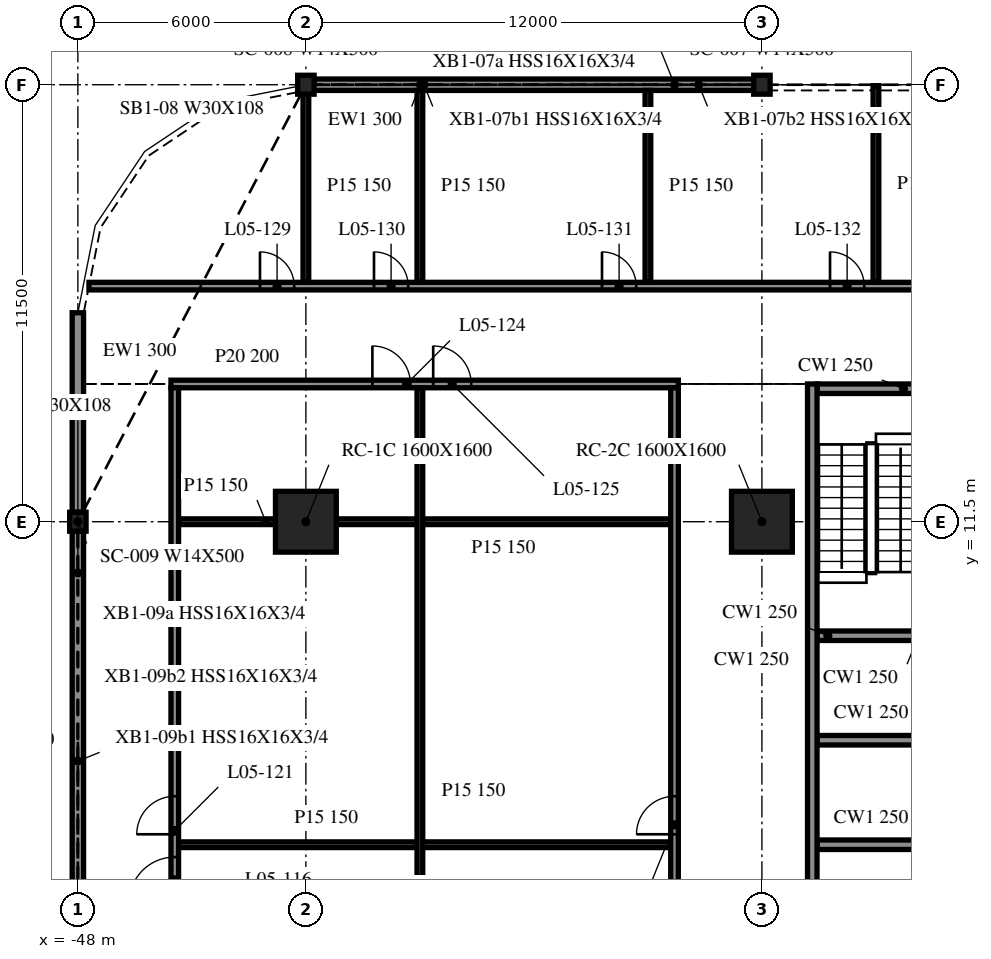
"""IFC4 building model, lengths in metres.
Left out: names, types, materials, properties, quantities, classifications, styles, units other than length and angle.
Written with IfcOpenShell. Run it as: python <this file> out.ifc"""

import sys

from ifc_helpers import new_model, si_unit, direction, frame, frame_2d, origin, origin_2d, place, context, subcontext, project, spatial, rectangle, i_section, extrude, element, fill, save


model = new_model("IFC4")
c1 = context("Model", 3, precision=1e-05, world=origin(), true_north=direction((0.0, 1.0)))
c2 = subcontext(c1, "Body", "Model", "MODEL_VIEW")
j1 = project(units=[si_unit("LENGTHUNIT", "METRE"), si_unit("PLANEANGLEUNIT", "RADIAN")], contexts=[c1])
p1 = place(None, origin())
s1 = spatial("IfcSite", under=j1, at=p1, CompositionType="ELEMENT")
p2 = place(p1, origin())
s2 = spatial("IfcBuilding", under=s1, at=p2, CompositionType="ELEMENT")
p3 = place(p2, frame((0.0, 0.0, 24.4)))
s3 = spatial("IfcBuildingStorey", under=s2, at=p3, CompositionType="ELEMENT", Elevation=24.4)
for number, where, z_axis, x_axis in (
    (1, (-42.0, 11.5, -0.34), (0.0, 0.0, 1.0), (1.0, 0.0, 0.0)),
    (2, (-30.0, 11.5, -0.34), (0.0, 0.0, 1.0), (1.0, 0.0, 0.0)),
):
    element("IfcColumn", number, at=place(p3, frame(where, z_axis=z_axis, x_axis=x_axis)), inside=s3, PredefinedType="COLUMN", context=c2, shape_type="SweptSolid", body=[
        extrude(rectangle(XDim=1.6, YDim=1.6, at=origin_2d()), origin(), (0.0, 0.0, 1.0), 4.3),
    ])
for number, where, z_axis, x_axis in (
    (3, (-30.0, 23.0, -0.34), (0.0, 0.0, 1.0), (1.0, 0.0, 0.0)),
    (4, (-42.0, 23.0, -0.34), (0.0, 0.0, 1.0), (1.0, 0.0, 0.0)),
    (5, (-48.0, 11.5, -0.34), (0.0, 0.0, 1.0), (1.0, 0.0, 0.0)),
):
    element("IfcColumn", number, at=place(p3, frame(where, z_axis=z_axis, x_axis=x_axis)), inside=s3, PredefinedType="COLUMN", context=c2, shape_type="SweptSolid", body=[
        extrude(i_section(OverallWidth=0.432, OverallDepth=0.498, WebThickness=0.056, FlangeThickness=0.089, at=origin_2d()), origin(), (0.0, 0.0, 1.0), 4.3),
    ])
p4 = place(p3, frame((-30.028, 23.0, 0.0), z_axis=(0.0, 0.0, 1.0), x_axis=(-1.0, 0.0, 0.0)))
e6 = element("IfcWall", 6, at=p4, inside=s3, PredefinedType="NOTDEFINED", context=c2, shape_type="SweptSolid", body=[
    extrude(rectangle(XDim=11.944, YDim=0.3, at=frame_2d((5.972, 0.0))), origin(), (0.0, 0.0, 1.0), 3.203),
])
p5 = place(p3, frame((-48.0, 17.0, 0.0), z_axis=(0.0, 0.0, 1.0), x_axis=(0.0, -1.0, 0.0)))
e7 = element("IfcWall", 7, at=p5, inside=s3, PredefinedType="NOTDEFINED", context=c2, shape_type="SweptSolid", body=[
    extrude(rectangle(XDim=5.251, YDim=0.3, at=frame_2d((2.625, 0.0))), origin(), (0.0, 0.0, 1.0), 3.203),
])
p6 = place(p3, frame((-48.0, 11.251, 0.0), z_axis=(0.0, 0.0, 1.0), x_axis=(0.0, -1.0, 0.0)))
e8 = element("IfcWall", 8, at=p6, inside=s3, PredefinedType="NOTDEFINED", context=c2, shape_type="SweptSolid", body=[
    extrude(rectangle(XDim=11.002, YDim=0.3, at=frame_2d((5.501, 0.0))), origin(), (0.0, 0.0, 1.0), 3.203),
])
p7 = place(p3, frame((-28.675, 15.125, 0.0), z_axis=(0.0, 0.0, 1.0), x_axis=(0.0, -1.0, 0.0)))
e9 = element("IfcWall", 9, at=p7, inside=s3, PredefinedType="SOLIDWALL", context=c2, shape_type="SweptSolid", body=[
    extrude(rectangle(XDim=24.25, YDim=0.25, at=frame_2d((12.125, 0.0))), origin(), (0.0, 0.0, 1.0), 3.96),
])
p8 = place(p3, frame((-28.55, 15.0, 0.0), z_axis=(0.0, 0.0, 1.0), x_axis=(1.0, 0.0, 0.0)))
e10 = element("IfcWall", 10, at=p8, inside=s3, PredefinedType="SOLIDWALL", context=c2, shape_type="SweptSolid", body=[
    extrude(rectangle(XDim=9.1, YDim=0.25, at=frame_2d((4.55, 0.0))), origin(), (0.0, 0.0, 1.0), 3.96),
])
p9 = place(p8, frame((3.65, 0.0, 0.0)))
e11 = element("IfcOpeningElement", 11, at=p9, cuts=e10, PredefinedType="OPENING", context=c2, shape_type="SweptSolid", body=[
    extrude(rectangle(XDim=1.8, YDim=2.1, at=frame_2d((0.9, 1.05))), frame((0.0, 0.135, 0.0), z_axis=(0.0, -1.0, 0.0), x_axis=(1.0, 0.0, 0.0)), (0.0, 0.0, 1.0), 0.27),
])
for number, where, z_axis, x_axis in (
    (12, (-28.55, 3.0, 0.0), (0.0, 0.0, 1.0), (1.0, 0.0, 0.0)),
    (13, (-28.55, 5.75, 0.0), (0.0, 0.0, 1.0), (1.0, 0.0, 0.0)),
    (14, (-28.55, 8.5, 0.0), (0.0, 0.0, 1.0), (1.0, 0.0, 0.0)),
):
    element("IfcWall", number, at=place(p3, frame(where, z_axis=z_axis, x_axis=x_axis)), inside=s3, PredefinedType="SOLIDWALL", context=c2, shape_type="SweptSolid", body=[
        extrude(rectangle(XDim=2.85, YDim=0.25, at=frame_2d((1.425, 0.0))), origin(), (0.0, 0.0, 1.0), 3.96),
    ])
p10 = place(p3, frame((-45.35, 3.0, 0.0), z_axis=(0.0, 0.0, 1.0), x_axis=(1.0, 0.0, 0.0)))
e15 = element("IfcWall", 15, at=p10, inside=s3, PredefinedType="PARTITIONING", context=c2, shape_type="SweptSolid", body=[
    extrude(rectangle(XDim=12.95, YDim=0.15, at=frame_2d((6.475, 0.0))), origin(), (0.0, 0.0, 1.0), 3.96),
])
p11 = place(p3, frame((-45.35, 11.5, 0.0), z_axis=(0.0, 0.0, 1.0), x_axis=(1.0, 0.0, 0.0)))
e16 = element("IfcWall", 16, at=p11, inside=s3, PredefinedType="PARTITIONING", context=c2, shape_type="SweptSolid", body=[
    extrude(rectangle(XDim=2.55, YDim=0.15, at=frame_2d((1.275, 0.0))), origin(), (0.0, 0.0, 1.0), 3.96),
])
p12 = place(p3, frame((-41.2, 11.5, 0.0), z_axis=(0.0, 0.0, 1.0), x_axis=(1.0, 0.0, 0.0)))
e17 = element("IfcWall", 17, at=p12, inside=s3, PredefinedType="PARTITIONING", context=c2, shape_type="SweptSolid", body=[
    extrude(rectangle(XDim=8.8, YDim=0.15, at=frame_2d((4.4, 0.0))), origin(), (0.0, 0.0, 1.0), 3.96),
])
p13 = place(p3, frame((-45.55, 15.125, 0.0), z_axis=(0.0, 0.0, 1.0), x_axis=(1.0, 0.0, 0.0)))
e18 = element("IfcWall", 18, at=p13, inside=s3, PredefinedType="PARTITIONING", context=c2, shape_type="SweptSolid", body=[
    extrude(rectangle(XDim=13.35, YDim=0.2, at=frame_2d((6.675, 0.0))), origin(), (0.0, 0.0, 1.0), 3.96),
])
p14 = place(p13, frame((5.3, 0.0, 0.0)))
e19 = element("IfcOpeningElement", 19, at=p14, cuts=e18, PredefinedType="OPENING", context=c2, shape_type="SweptSolid", body=[
    extrude(rectangle(XDim=1.0, YDim=2.1, at=frame_2d((0.5, 1.05))), frame((0.0, 0.11, 0.0), z_axis=(0.0, -1.0, 0.0), x_axis=(1.0, 0.0, 0.0)), (0.0, 0.0, 1.0), 0.22),
])
p15 = place(p13, frame((6.9, 0.0, 0.0)))
e20 = element("IfcOpeningElement", 20, at=p15, cuts=e18, PredefinedType="OPENING", context=c2, shape_type="SweptSolid", body=[
    extrude(rectangle(XDim=1.0, YDim=2.1, at=frame_2d((0.5, 1.05))), frame((0.0, 0.11, 0.0), z_axis=(0.0, -1.0, 0.0), x_axis=(1.0, 0.0, 0.0)), (0.0, 0.0, 1.0), 0.22),
])
p16 = place(p3, frame((-47.708, 17.7, 0.0), z_axis=(0.0, 0.0, 1.0), x_axis=(1.0, 0.0, 0.0)))
e21 = element("IfcWall", 21, at=p16, inside=s3, PredefinedType="PARTITIONING", context=c2, shape_type="SweptSolid", body=[
    extrude(rectangle(XDim=95.416, YDim=0.2, at=frame_2d((47.708, 0.0))), origin(), (0.0, 0.0, 1.0), 3.96),
])
p17 = place(p16, frame((4.5, 0.0, 0.0)))
e22 = element("IfcOpeningElement", 22, at=p17, cuts=e21, PredefinedType="OPENING", context=c2, shape_type="SweptSolid", body=[
    extrude(rectangle(XDim=0.9, YDim=2.1, at=frame_2d((0.45, 1.05))), frame((0.0, 0.11, 0.0), z_axis=(0.0, -1.0, 0.0), x_axis=(1.0, 0.0, 0.0)), (0.0, 0.0, 1.0), 0.22),
])
p18 = place(p16, frame((7.5, 0.0, 0.0)))
e23 = element("IfcOpeningElement", 23, at=p18, cuts=e21, PredefinedType="OPENING", context=c2, shape_type="SweptSolid", body=[
    extrude(rectangle(XDim=0.9, YDim=2.1, at=frame_2d((0.45, 1.05))), frame((0.0, 0.11, 0.0), z_axis=(0.0, -1.0, 0.0), x_axis=(1.0, 0.0, 0.0)), (0.0, 0.0, 1.0), 0.22),
])
p19 = place(p16, frame((13.5, 0.0, 0.0)))
e24 = element("IfcOpeningElement", 24, at=p19, cuts=e21, PredefinedType="OPENING", context=c2, shape_type="SweptSolid", body=[
    extrude(rectangle(XDim=0.9, YDim=2.1, at=frame_2d((0.45, 1.05))), frame((0.0, 0.11, 0.0), z_axis=(0.0, -1.0, 0.0), x_axis=(1.0, 0.0, 0.0)), (0.0, 0.0, 1.0), 0.22),
])
p20 = place(p16, frame((19.5, 0.0, 0.0)))
e25 = element("IfcOpeningElement", 25, at=p20, cuts=e21, PredefinedType="OPENING", context=c2, shape_type="SweptSolid", body=[
    extrude(rectangle(XDim=0.9, YDim=2.1, at=frame_2d((0.45, 1.05))), frame((0.0, 0.11, 0.0), z_axis=(0.0, -1.0, 0.0), x_axis=(1.0, 0.0, 0.0)), (0.0, 0.0, 1.0), 0.22),
])
p21 = place(p16, frame((28.5, 0.0, 0.0)))
e26 = element("IfcOpeningElement", 26, at=p21, cuts=e21, PredefinedType="OPENING", context=c2, shape_type="SweptSolid", body=[
    extrude(rectangle(XDim=0.9, YDim=2.1, at=frame_2d((0.45, 1.05))), frame((0.0, 0.11, 0.0), z_axis=(0.0, -1.0, 0.0), x_axis=(1.0, 0.0, 0.0)), (0.0, 0.0, 1.0), 0.22),
])
p22 = place(p16, frame((31.5, 0.0, 0.0)))
e27 = element("IfcOpeningElement", 27, at=p22, cuts=e21, PredefinedType="OPENING", context=c2, shape_type="SweptSolid", body=[
    extrude(rectangle(XDim=0.9, YDim=2.1, at=frame_2d((0.45, 1.05))), frame((0.0, 0.11, 0.0), z_axis=(0.0, -1.0, 0.0), x_axis=(1.0, 0.0, 0.0)), (0.0, 0.0, 1.0), 0.22),
])
p23 = place(p16, frame((34.5, 0.0, 0.0)))
e28 = element("IfcOpeningElement", 28, at=p23, cuts=e21, PredefinedType="OPENING", context=c2, shape_type="SweptSolid", body=[
    extrude(rectangle(XDim=0.9, YDim=2.1, at=frame_2d((0.45, 1.05))), frame((0.0, 0.11, 0.0), z_axis=(0.0, -1.0, 0.0), x_axis=(1.0, 0.0, 0.0)), (0.0, 0.0, 1.0), 0.22),
])
p24 = place(p16, frame((37.5, 0.0, 0.0)))
e29 = element("IfcOpeningElement", 29, at=p24, cuts=e21, PredefinedType="OPENING", context=c2, shape_type="SweptSolid", body=[
    extrude(rectangle(XDim=0.9, YDim=2.1, at=frame_2d((0.45, 1.05))), frame((0.0, 0.11, 0.0), z_axis=(0.0, -1.0, 0.0), x_axis=(1.0, 0.0, 0.0)), (0.0, 0.0, 1.0), 0.22),
])
p25 = place(p16, frame((43.5, 0.0, 0.0)))
e30 = element("IfcOpeningElement", 30, at=p25, cuts=e21, PredefinedType="OPENING", context=c2, shape_type="SweptSolid", body=[
    extrude(rectangle(XDim=0.9, YDim=2.1, at=frame_2d((0.45, 1.05))), frame((0.0, 0.11, 0.0), z_axis=(0.0, -1.0, 0.0), x_axis=(1.0, 0.0, 0.0)), (0.0, 0.0, 1.0), 0.22),
])
p26 = place(p16, frame((47.3, 0.0, 0.0)))
e31 = element("IfcOpeningElement", 31, at=p26, cuts=e21, PredefinedType="OPENING", context=c2, shape_type="SweptSolid", body=[
    extrude(rectangle(XDim=0.9, YDim=2.1, at=frame_2d((0.45, 1.05))), frame((0.0, 0.11, 0.0), z_axis=(0.0, -1.0, 0.0), x_axis=(1.0, 0.0, 0.0)), (0.0, 0.0, 1.0), 0.22),
])
p27 = place(p16, frame((51.1, 0.0, 0.0)))
e32 = element("IfcOpeningElement", 32, at=p27, cuts=e21, PredefinedType="OPENING", context=c2, shape_type="SweptSolid", body=[
    extrude(rectangle(XDim=0.9, YDim=2.1, at=frame_2d((0.45, 1.05))), frame((0.0, 0.11, 0.0), z_axis=(0.0, -1.0, 0.0), x_axis=(1.0, 0.0, 0.0)), (0.0, 0.0, 1.0), 0.22),
])
p28 = place(p16, frame((60.1, 0.0, 0.0)))
e33 = element("IfcOpeningElement", 33, at=p28, cuts=e21, PredefinedType="OPENING", context=c2, shape_type="SweptSolid", body=[
    extrude(rectangle(XDim=0.9, YDim=2.1, at=frame_2d((0.45, 1.05))), frame((0.0, 0.11, 0.0), z_axis=(0.0, -1.0, 0.0), x_axis=(1.0, 0.0, 0.0)), (0.0, 0.0, 1.0), 0.22),
])
p29 = place(p16, frame((63.1, 0.0, 0.0)))
e34 = element("IfcOpeningElement", 34, at=p29, cuts=e21, PredefinedType="OPENING", context=c2, shape_type="SweptSolid", body=[
    extrude(rectangle(XDim=0.9, YDim=2.1, at=frame_2d((0.45, 1.05))), frame((0.0, 0.11, 0.0), z_axis=(0.0, -1.0, 0.0), x_axis=(1.0, 0.0, 0.0)), (0.0, 0.0, 1.0), 0.22),
])
p30 = place(p16, frame((66.1, 0.0, 0.0)))
e35 = element("IfcOpeningElement", 35, at=p30, cuts=e21, PredefinedType="OPENING", context=c2, shape_type="SweptSolid", body=[
    extrude(rectangle(XDim=0.9, YDim=2.1, at=frame_2d((0.45, 1.05))), frame((0.0, 0.11, 0.0), z_axis=(0.0, -1.0, 0.0), x_axis=(1.0, 0.0, 0.0)), (0.0, 0.0, 1.0), 0.22),
])
p31 = place(p16, frame((69.1, 0.0, 0.0)))
e36 = element("IfcOpeningElement", 36, at=p31, cuts=e21, PredefinedType="OPENING", context=c2, shape_type="SweptSolid", body=[
    extrude(rectangle(XDim=0.9, YDim=2.1, at=frame_2d((0.45, 1.05))), frame((0.0, 0.11, 0.0), z_axis=(0.0, -1.0, 0.0), x_axis=(1.0, 0.0, 0.0)), (0.0, 0.0, 1.0), 0.22),
])
p32 = place(p16, frame((75.1, 0.0, 0.0)))
e37 = element("IfcOpeningElement", 37, at=p32, cuts=e21, PredefinedType="OPENING", context=c2, shape_type="SweptSolid", body=[
    extrude(rectangle(XDim=0.9, YDim=2.1, at=frame_2d((0.45, 1.05))), frame((0.0, 0.11, 0.0), z_axis=(0.0, -1.0, 0.0), x_axis=(1.0, 0.0, 0.0)), (0.0, 0.0, 1.0), 0.22),
])
p33 = place(p16, frame((81.1, 0.0, 0.0)))
e38 = element("IfcOpeningElement", 38, at=p33, cuts=e21, PredefinedType="OPENING", context=c2, shape_type="SweptSolid", body=[
    extrude(rectangle(XDim=0.9, YDim=2.1, at=frame_2d((0.45, 1.05))), frame((0.0, 0.11, 0.0), z_axis=(0.0, -1.0, 0.0), x_axis=(1.0, 0.0, 0.0)), (0.0, 0.0, 1.0), 0.22),
])
p34 = place(p16, frame((90.1, 0.0, 0.0)))
e39 = element("IfcOpeningElement", 39, at=p34, cuts=e21, PredefinedType="OPENING", context=c2, shape_type="SweptSolid", body=[
    extrude(rectangle(XDim=0.9, YDim=2.1, at=frame_2d((0.45, 1.05))), frame((0.0, 0.11, 0.0), z_axis=(0.0, -1.0, 0.0), x_axis=(1.0, 0.0, 0.0)), (0.0, 0.0, 1.0), 0.22),
])
p35 = place(p3, frame((-45.45, -9.025, 0.0), z_axis=(0.0, 0.0, 1.0), x_axis=(0.0, 1.0, 0.0)))
e40 = element("IfcWall", 40, at=p35, inside=s3, PredefinedType="PARTITIONING", context=c2, shape_type="SweptSolid", body=[
    extrude(rectangle(XDim=24.05, YDim=0.2, at=frame_2d((12.025, 0.0))), origin(), (0.0, 0.0, 1.0), 3.96),
])
p36 = place(p35, frame((10.5, 0.0, 0.0)))
e41 = element("IfcOpeningElement", 41, at=p36, cuts=e40, PredefinedType="OPENING", context=c2, shape_type="SweptSolid", body=[
    extrude(rectangle(XDim=1.2, YDim=2.1, at=frame_2d((0.6, 1.05))), frame((0.0, 0.11, 0.0), z_axis=(0.0, -1.0, 0.0), x_axis=(1.0, 0.0, 0.0)), (0.0, 0.0, 1.0), 0.22),
])
p37 = place(p35, frame((12.3, 0.0, 0.0)))
e42 = element("IfcOpeningElement", 42, at=p37, cuts=e40, PredefinedType="OPENING", context=c2, shape_type="SweptSolid", body=[
    extrude(rectangle(XDim=1.0, YDim=2.1, at=frame_2d((0.5, 1.05))), frame((0.0, 0.11, 0.0), z_axis=(0.0, -1.0, 0.0), x_axis=(1.0, 0.0, 0.0)), (0.0, 0.0, 1.0), 0.22),
])
p38 = place(p3, frame((-42.0, 17.8, 0.0), z_axis=(0.0, 0.0, 1.0), x_axis=(0.0, 1.0, 0.0)))
e43 = element("IfcWall", 43, at=p38, inside=s3, PredefinedType="PARTITIONING", context=c2, shape_type="SweptSolid", body=[
    extrude(rectangle(XDim=5.047, YDim=0.15, at=frame_2d((2.523, 0.0))), origin(), (0.0, 0.0, 1.0), 3.96),
])
p39 = place(p3, frame((-39.0, -9.025, 0.0), z_axis=(0.0, 0.0, 1.0), x_axis=(0.0, 1.0, 0.0)))
e44 = element("IfcWall", 44, at=p39, inside=s3, PredefinedType="PARTITIONING", context=c2, shape_type="SweptSolid", body=[
    extrude(rectangle(XDim=24.05, YDim=0.15, at=frame_2d((12.025, 0.0))), origin(), (0.0, 0.0, 1.0), 3.96),
])
for number, where, z_axis, x_axis in (
    (45, (-39.0, 17.8, 0.0), (0.0, 0.0, 1.0), (0.0, 1.0, 0.0)),
    (46, (-33.0, 17.8, 0.0), (0.0, 0.0, 1.0), (0.0, 1.0, 0.0)),
):
    element("IfcWall", number, at=place(p3, frame(where, z_axis=z_axis, x_axis=x_axis)), inside=s3, PredefinedType="PARTITIONING", context=c2, shape_type="SweptSolid", body=[
        extrude(rectangle(XDim=5.05, YDim=0.15, at=frame_2d((2.525, 0.0))), origin(), (0.0, 0.0, 1.0), 3.96),
    ])
p40 = place(p3, frame((-32.3, -9.025, 0.0), z_axis=(0.0, 0.0, 1.0), x_axis=(0.0, 1.0, 0.0)))
e47 = element("IfcWall", 47, at=p40, inside=s3, PredefinedType="PARTITIONING", context=c2, shape_type="SweptSolid", body=[
    extrude(rectangle(XDim=24.05, YDim=0.2, at=frame_2d((12.025, 0.0))), origin(), (0.0, 0.0, 1.0), 3.96),
])
p41 = place(p40, frame((12.3, 0.0, 0.0)))
e48 = element("IfcOpeningElement", 48, at=p41, cuts=e47, PredefinedType="OPENING", context=c2, shape_type="SweptSolid", body=[
    extrude(rectangle(XDim=1.0, YDim=2.1, at=frame_2d((0.5, 1.05))), frame((0.0, 0.11, 0.0), z_axis=(0.0, -1.0, 0.0), x_axis=(1.0, 0.0, 0.0)), (0.0, 0.0, 1.0), 0.22),
])
p42 = place(p3, frame((-27.0, 17.8, 0.0), z_axis=(0.0, 0.0, 1.0), x_axis=(0.0, 1.0, 0.0)))
e49 = element("IfcWall", 49, at=p42, inside=s3, PredefinedType="PARTITIONING", context=c2, shape_type="SweptSolid", body=[
    extrude(rectangle(XDim=5.175, YDim=0.15, at=frame_2d((2.587, 0.0))), origin(), (0.0, 0.0, 1.0), 3.96),
])
p43 = place(p36, origin())
e50 = element("IfcDoor", 50, at=p43, inside=s3, OperationType="SINGLE_SWING_RIGHT", PredefinedType="DOOR", context=c2, shape_type="SweptSolid", body=[
    extrude(rectangle(XDim=1.2, YDim=2.1, at=frame_2d((0.6, 1.05))), frame((0.0, 0.025, 0.0), z_axis=(0.0, -1.0, 0.0), x_axis=(1.0, 0.0, 0.0)), (0.0, 0.0, 1.0), 0.05),
])
fill(e41, e50)
p44 = place(p37, origin())
e51 = element("IfcDoor", 51, at=p44, inside=s3, OperationType="SINGLE_SWING_LEFT", PredefinedType="DOOR", context=c2, shape_type="SweptSolid", body=[
    extrude(rectangle(XDim=1.0, YDim=2.1, at=frame_2d((0.5, 1.05))), frame((0.0, 0.025, 0.0), z_axis=(0.0, -1.0, 0.0), x_axis=(1.0, 0.0, 0.0)), (0.0, 0.0, 1.0), 0.05),
])
fill(e42, e51)
p45 = place(p41, origin())
e52 = element("IfcDoor", 52, at=p45, inside=s3, OperationType="SINGLE_SWING_RIGHT", PredefinedType="DOOR", context=c2, shape_type="SweptSolid", body=[
    extrude(rectangle(XDim=1.0, YDim=2.1, at=frame_2d((0.5, 1.05))), frame((0.0, 0.025, 0.0), z_axis=(0.0, -1.0, 0.0), x_axis=(1.0, 0.0, 0.0)), (0.0, 0.0, 1.0), 0.05),
])
fill(e48, e52)
p46 = place(p14, origin())
e53 = element("IfcDoor", 53, at=p46, inside=s3, OperationType="SINGLE_SWING_RIGHT", PredefinedType="DOOR", context=c2, shape_type="SweptSolid", body=[
    extrude(rectangle(XDim=1.0, YDim=2.1, at=frame_2d((0.5, 1.05))), frame((0.0, 0.025, 0.0), z_axis=(0.0, -1.0, 0.0), x_axis=(1.0, 0.0, 0.0)), (0.0, 0.0, 1.0), 0.05),
])
fill(e19, e53)
p47 = place(p15, origin())
e54 = element("IfcDoor", 54, at=p47, inside=s3, OperationType="SINGLE_SWING_LEFT", PredefinedType="DOOR", context=c2, shape_type="SweptSolid", body=[
    extrude(rectangle(XDim=1.0, YDim=2.1, at=frame_2d((0.5, 1.05))), frame((0.0, 0.025, 0.0), z_axis=(0.0, -1.0, 0.0), x_axis=(1.0, 0.0, 0.0)), (0.0, 0.0, 1.0), 0.05),
])
fill(e20, e54)
p48 = place(p17, origin())
e55 = element("IfcDoor", 55, at=p48, inside=s3, OperationType="SINGLE_SWING_LEFT", PredefinedType="DOOR", context=c2, shape_type="SweptSolid", body=[
    extrude(rectangle(XDim=0.9, YDim=2.1, at=frame_2d((0.45, 1.05))), frame((0.0, 0.025, 0.0), z_axis=(0.0, -1.0, 0.0), x_axis=(1.0, 0.0, 0.0)), (0.0, 0.0, 1.0), 0.05),
])
fill(e22, e55)
p49 = place(p18, origin())
e56 = element("IfcDoor", 56, at=p49, inside=s3, OperationType="SINGLE_SWING_LEFT", PredefinedType="DOOR", context=c2, shape_type="SweptSolid", body=[
    extrude(rectangle(XDim=0.9, YDim=2.1, at=frame_2d((0.45, 1.05))), frame((0.0, 0.025, 0.0), z_axis=(0.0, -1.0, 0.0), x_axis=(1.0, 0.0, 0.0)), (0.0, 0.0, 1.0), 0.05),
])
fill(e23, e56)
p50 = place(p19, origin())
e57 = element("IfcDoor", 57, at=p50, inside=s3, OperationType="SINGLE_SWING_LEFT", PredefinedType="DOOR", context=c2, shape_type="SweptSolid", body=[
    extrude(rectangle(XDim=0.9, YDim=2.1, at=frame_2d((0.45, 1.05))), frame((0.0, 0.025, 0.0), z_axis=(0.0, -1.0, 0.0), x_axis=(1.0, 0.0, 0.0)), (0.0, 0.0, 1.0), 0.05),
])
fill(e24, e57)
p51 = place(p20, origin())
e58 = element("IfcDoor", 58, at=p51, inside=s3, OperationType="SINGLE_SWING_LEFT", PredefinedType="DOOR", context=c2, shape_type="SweptSolid", body=[
    extrude(rectangle(XDim=0.9, YDim=2.1, at=frame_2d((0.45, 1.05))), frame((0.0, 0.025, 0.0), z_axis=(0.0, -1.0, 0.0), x_axis=(1.0, 0.0, 0.0)), (0.0, 0.0, 1.0), 0.05),
])
fill(e25, e58)
save(model, sys.argv[1])
